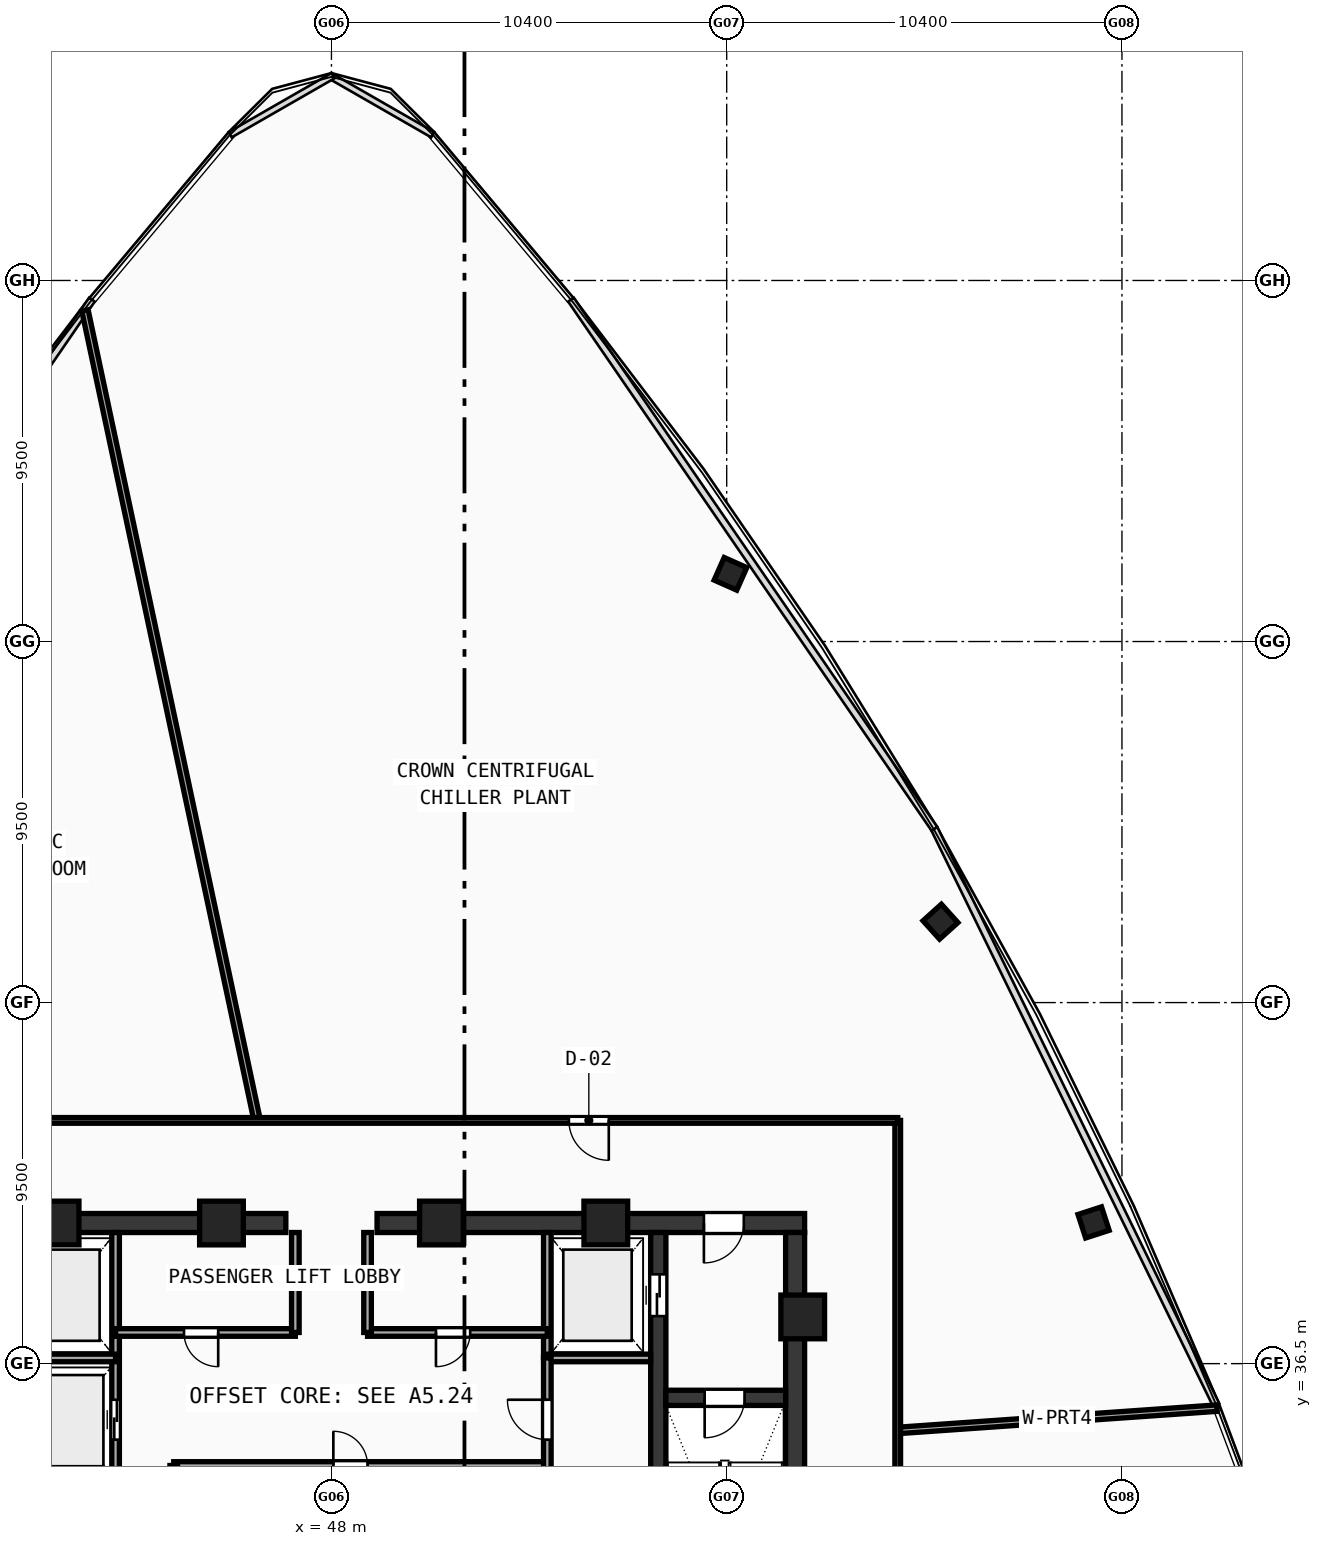
"""IFC4 building model, lengths in metres.
Left out: names, types, materials, properties, quantities, classifications, styles, units other than length and angle.
Written with IfcOpenShell. Run it as: python <this file> out.ifc"""

import sys

from ifc_helpers import new_model, si_unit, direction, frame, frame_2d, origin, origin_with_axes, origin_2d, place, context, subcontext, project, spatial, rectangle, hollow_rectangle, extrude, source, transform, mapped, element, fill, save


model = new_model("IFC4")
c1 = context("Model", 3, precision=1e-05, world=origin(), true_north=direction((0.0, 1.0)))
c2 = subcontext(c1, "Body", "Model", "MODEL_VIEW")
j1 = project(units=[si_unit("LENGTHUNIT", "METRE"), si_unit("PLANEANGLEUNIT", "RADIAN")], contexts=[c1])
p1 = place(None, origin())
s1 = spatial("IfcSite", under=j1, at=p1, CompositionType="ELEMENT")
p2 = place(p1, origin())
s2 = spatial("IfcBuilding", under=s1, at=p2, CompositionType="ELEMENT")
p3 = place(p2, frame((0.0, 0.0, 386.76)))
s3 = spatial("IfcBuildingStorey", under=s2, at=p3, CompositionType="ELEMENT", Elevation=386.76)
p4 = place(p3, frame((35.55, 40.2, 0.0), z_axis=(0.0, 0.0, 1.0), x_axis=(1.0, 0.0, 0.0)))
e1 = element("IfcWall", 1, at=p4, inside=s3, PredefinedType="SHEAR", context=c2, shape_type="SweptSolid", body=[
    extrude(rectangle(XDim=11.25, YDim=0.5, at=frame_2d((5.625, 0.0))), origin(), (0.0, 0.0, 1.0), 4.72),
])
p5 = place(p4, frame((1.6, 0.0, 0.0)))
e2 = element("IfcOpeningElement", 2, at=p5, cuts=e1, PredefinedType="OPENING", context=c2, shape_type="SweptSolid", body=[
    extrude(rectangle(XDim=1.05, YDim=2.1, at=frame_2d((0.525, 1.05))), frame((0.0, 0.26, 0.0), z_axis=(0.0, -1.0, 0.0), x_axis=(1.0, 0.0, 0.0)), (0.0, 0.0, 1.0), 0.52),
])
p6 = place(p3, frame((49.2, 40.2, 0.0), z_axis=(0.0, 0.0, 1.0), x_axis=(1.0, 0.0, 0.0)))
e3 = element("IfcWall", 3, at=p6, inside=s3, PredefinedType="SHEAR", context=c2, shape_type="SweptSolid", body=[
    extrude(rectangle(XDim=11.25, YDim=0.5, at=frame_2d((5.625, 0.0))), origin(), (0.0, 0.0, 1.0), 4.72),
])
p7 = place(p6, frame((8.6, 0.0, 0.0)))
e4 = element("IfcOpeningElement", 4, at=p7, cuts=e3, PredefinedType="OPENING", context=c2, shape_type="SweptSolid", body=[
    extrude(rectangle(XDim=1.05, YDim=2.1, at=frame_2d((0.525, 1.05))), frame((0.0, 0.26, 0.0), z_axis=(0.0, -1.0, 0.0), x_axis=(1.0, 0.0, 0.0)), (0.0, 0.0, 1.0), 0.52),
])
p8 = place(p3, frame((60.2, 27.75, 0.0), z_axis=(0.0, 0.0, 1.0), x_axis=(0.0, 1.0, 0.0)))
e5 = element("IfcWall", 5, at=p8, inside=s3, PredefinedType="SHEAR", context=c2, shape_type="SweptSolid", body=[
    extrude(rectangle(XDim=12.2, YDim=0.5, at=frame_2d((6.1, 0.0))), origin(), (0.0, 0.0, 1.0), 4.72),
])
p9 = place(p3, frame((56.6, 27.75, 0.0), z_axis=(0.0, 0.0, 1.0), x_axis=(0.0, 1.0, 0.0)))
e6 = element("IfcWall", 6, at=p9, inside=s3, PredefinedType="SHEAR", context=c2, shape_type="SweptSolid", body=[
    extrude(rectangle(XDim=12.2, YDim=0.4, at=frame_2d((6.1, 0.0))), origin(), (0.0, 0.0, 1.0), 4.72),
])
p10 = place(p9, frame((10.0, 0.0, 0.0)))
e7 = element("IfcOpeningElement", 7, at=p10, cuts=e6, PredefinedType="OPENING", context=c2, shape_type="SweptSolid", body=[
    extrude(rectangle(XDim=1.1, YDim=2.1, at=frame_2d((0.55, 1.05))), frame((0.0, 0.21, 0.0), z_axis=(0.0, -1.0, 0.0), x_axis=(1.0, 0.0, 0.0)), (0.0, 0.0, 1.0), 0.42),
])
p11 = place(p3, frame((56.8, 35.6, 0.0), z_axis=(0.0, 0.0, 1.0), x_axis=(1.0, 0.0, 0.0)))
e8 = element("IfcWall", 8, at=p11, inside=s3, PredefinedType="SHEAR", context=c2, shape_type="SweptSolid", body=[
    extrude(rectangle(XDim=3.15, YDim=0.4, at=frame_2d((1.575, 0.0))), origin(), (0.0, 0.0, 1.0), 4.72),
])
p12 = place(p11, frame((1.02, 0.0, 0.0)))
e9 = element("IfcOpeningElement", 9, at=p12, cuts=e8, PredefinedType="OPENING", context=c2, shape_type="SweptSolid", body=[
    extrude(rectangle(XDim=1.05, YDim=2.1, at=frame_2d((0.525, 1.05))), frame((0.0, 0.21, 0.0), z_axis=(0.0, -1.0, 0.0), x_axis=(1.0, 0.0, 0.0)), (0.0, 0.0, 1.0), 0.42),
])
m1 = source(origin(), c2, "Body", "SweptSolid", [
    extrude(hollow_rectangle(XDim=1.15, YDim=1.15, WallThickness=0.048, at=origin_2d()), origin(), (0.0, 0.0, 1.0), 5.0),
])
for number, where, z_axis, x_axis in (
    (10, (60.4, 37.729, -0.28), (0.0, 0.0, 1.0), (1.0, 0.0, 0.0)),
    (11, (55.219, 40.2, -0.28), (0.0, 0.0, 1.0), (1.0, 0.0, 0.0)),
    (12, (50.894, 40.2, -0.28), (0.0, 0.0, 1.0), (1.0, 0.0, 0.0)),
    (13, (45.106, 40.2, -0.28), (0.0, 0.0, 1.0), (1.0, 0.0, 0.0)),
    (14, (40.781, 40.2, -0.28), (0.0, 0.0, 1.0), (1.0, 0.0, 0.0)),
):
    element("IfcColumn", number, at=place(p3, frame(where, z_axis=z_axis, x_axis=x_axis)), inside=s3, PredefinedType="COLUMN", context=c2, shape_type="MappedRepresentation", body=[
        mapped(m1, transform((0.0, 0.0, 0.0), scale=1.0)),
    ])
m2 = source(origin(), c2, "Body", "SweptSolid", [
    extrude(hollow_rectangle(XDim=0.65, YDim=0.65, WallThickness=0.024, at=origin_2d()), origin(), (0.0, 0.0, 1.0), 5.0),
])
for number, where, z_axis, x_axis in (
    (15, (68.053, 40.216, -0.28), (0.0, 0.0, 1.0), (-0.309, 0.951, 0.0)),
    (16, (64.025, 48.129, -0.28), (0.0, 0.0, 1.0), (-0.669, 0.743, 0.0)),
    (17, (58.499, 57.281, -0.28), (0.0, 0.0, 1.0), (-0.914, 0.407, 0.0)),
):
    element("IfcColumn", number, at=place(p3, frame(where, z_axis=z_axis, x_axis=x_axis)), inside=s3, PredefinedType="COLUMN", context=c2, shape_type="MappedRepresentation", body=[
        mapped(m2, transform((0.0, 0.0, 0.0), scale=1.0)),
    ])
p13 = place(p3, frame((42.32, 33.5, 0.0), z_axis=(0.0, 0.0, 1.0), x_axis=(0.0, 1.0, 0.0)))
e18 = element("IfcWall", 18, at=p13, inside=s3, PredefinedType="SOLIDWALL", context=c2, shape_type="SweptSolid", body=[
    extrude(rectangle(XDim=6.45, YDim=0.2, at=frame_2d((3.225, 0.0))), origin(), (0.0, 0.0, 1.0), 4.72),
])
p14 = place(p13, frame((1.0, 0.0, 0.0)))
e19 = element("IfcOpeningElement", 19, at=p14, cuts=e18, PredefinedType="OPENING", context=c2, shape_type="SweptSolid", body=[
    extrude(rectangle(XDim=1.05, YDim=2.1, at=frame_2d((0.525, 1.05))), frame((0.0, 0.11, 0.0), z_axis=(0.0, -1.0, 0.0), x_axis=(1.0, 0.0, 0.0)), (0.0, 0.0, 1.0), 0.22),
])
p15 = place(p3, frame((39.6, 36.65, 0.0), z_axis=(0.0, 0.0, 1.0), x_axis=(1.0, 0.0, 0.0)))
e20 = element("IfcWall", 20, at=p15, inside=s3, PredefinedType="SOLIDWALL", context=c2, shape_type="SweptSolid", body=[
    extrude(rectangle(XDim=2.72, YDim=0.2, at=frame_2d((1.36, 0.0))), origin(), (0.0, 0.0, 1.0), 4.72),
])
p16 = place(p3, frame((53.68, 36.65, 0.0), z_axis=(0.0, 0.0, 1.0), x_axis=(0.0, 1.0, 0.0)))
e21 = element("IfcWall", 21, at=p16, inside=s3, PredefinedType="SOLIDWALL", context=c2, shape_type="SweptSolid", body=[
    extrude(rectangle(XDim=3.3, YDim=0.2, at=frame_2d((1.65, 0.0))), origin(), (0.0, 0.0, 1.0), 4.72),
])
p17 = place(p3, frame((53.68, 36.65, 0.0), z_axis=(0.0, 0.0, 1.0), x_axis=(1.0, 0.0, 0.0)))
e22 = element("IfcWall", 22, at=p17, inside=s3, PredefinedType="SOLIDWALL", context=c2, shape_type="SweptSolid", body=[
    extrude(rectangle(XDim=2.72, YDim=0.2, at=frame_2d((1.36, 0.0))), origin(), (0.0, 0.0, 1.0), 4.72),
])
p18 = place(p3, frame((42.32, 37.32, 0.0), z_axis=(0.0, 0.0, 1.0), x_axis=(1.0, 0.0, 0.0)))
e23 = element("IfcWall", 23, at=p18, inside=s3, PredefinedType="SOLIDWALL", context=c2, shape_type="SweptSolid", body=[
    extrude(rectangle(XDim=4.73, YDim=0.2, at=frame_2d((2.365, 0.0))), origin(), (0.0, 0.0, 1.0), 4.72),
])
p19 = place(p18, frame((1.8, 0.0, 0.0)))
e24 = element("IfcOpeningElement", 24, at=p19, cuts=e23, PredefinedType="OPENING", context=c2, shape_type="SweptSolid", body=[
    extrude(rectangle(XDim=0.9, YDim=2.1, at=frame_2d((0.45, 1.05))), frame((0.0, 0.11, 0.0), z_axis=(0.0, -1.0, 0.0), x_axis=(1.0, 0.0, 0.0)), (0.0, 0.0, 1.0), 0.22),
])
p20 = place(p3, frame((48.95, 37.32, 0.0), z_axis=(0.0, 0.0, 1.0), x_axis=(1.0, 0.0, 0.0)))
e25 = element("IfcWall", 25, at=p20, inside=s3, PredefinedType="SOLIDWALL", context=c2, shape_type="SweptSolid", body=[
    extrude(rectangle(XDim=4.73, YDim=0.2, at=frame_2d((2.365, 0.0))), origin(), (0.0, 0.0, 1.0), 4.72),
])
p21 = place(p20, frame((1.8, 0.0, 0.0)))
e26 = element("IfcOpeningElement", 26, at=p21, cuts=e25, PredefinedType="OPENING", context=c2, shape_type="SweptSolid", body=[
    extrude(rectangle(XDim=0.9, YDim=2.1, at=frame_2d((0.45, 1.05))), frame((0.0, 0.11, 0.0), z_axis=(0.0, -1.0, 0.0), x_axis=(1.0, 0.0, 0.0)), (0.0, 0.0, 1.0), 0.22),
])
for number, where, z_axis, x_axis in (
    (27, (47.05, 37.32, 0.0), (0.0, 0.0, 1.0), (0.0, 1.0, 0.0)),
    (28, (48.95, 37.32, 0.0), (0.0, 0.0, 1.0), (0.0, 1.0, 0.0)),
):
    element("IfcWall", number, at=place(p3, frame(where, z_axis=z_axis, x_axis=x_axis)), inside=s3, PredefinedType="SOLIDWALL", context=c2, shape_type="SweptSolid", body=[
        extrude(rectangle(XDim=2.63, YDim=0.2, at=frame_2d((1.315, 0.0))), origin(), (0.0, 0.0, 1.0), 4.72),
    ])
p22 = place(p3, frame((43.85, 33.82, 0.0), z_axis=(0.0, 0.0, 1.0), x_axis=(1.0, 0.0, 0.0)))
e29 = element("IfcWall", 29, at=p22, inside=s3, PredefinedType="SOLIDWALL", context=c2, shape_type="SweptSolid", body=[
    extrude(rectangle(XDim=9.83, YDim=0.2, at=frame_2d((4.915, 0.0))), origin(), (0.0, 0.0, 1.0), 4.72),
])
p23 = place(p22, frame((4.2, 0.0, 0.0)))
e30 = element("IfcOpeningElement", 30, at=p23, cuts=e29, PredefinedType="OPENING", context=c2, shape_type="SweptSolid", body=[
    extrude(rectangle(XDim=0.9, YDim=2.1, at=frame_2d((0.45, 1.05))), frame((0.0, 0.11, 0.0), z_axis=(0.0, -1.0, 0.0), x_axis=(1.0, 0.0, 0.0)), (0.0, 0.0, 1.0), 0.22),
])
p24 = place(p3, frame((43.85, 27.6, 0.0), z_axis=(0.0, 0.0, 1.0), x_axis=(0.0, 1.0, 0.0)))
e31 = element("IfcWall", 31, at=p24, inside=s3, PredefinedType="SOLIDWALL", context=c2, shape_type="SweptSolid", body=[
    extrude(rectangle(XDim=6.22, YDim=0.2, at=frame_2d((3.11, 0.0))), origin(), (0.0, 0.0, 1.0), 4.72),
])
p25 = place(p24, frame((2.25, 0.0, 0.0)))
e32 = element("IfcOpeningElement", 32, at=p25, cuts=e31, PredefinedType="OPENING", context=c2, shape_type="SweptSolid", body=[
    extrude(rectangle(XDim=1.05, YDim=2.1, at=frame_2d((0.525, 1.05))), frame((0.0, 0.11, 0.0), z_axis=(0.0, -1.0, 0.0), x_axis=(1.0, 0.0, 0.0)), (0.0, 0.0, 1.0), 0.22),
])
p26 = place(p3, frame((53.68, 27.6, 0.0), z_axis=(0.0, 0.0, 1.0), x_axis=(0.0, 1.0, 0.0)))
e33 = element("IfcWall", 33, at=p26, inside=s3, PredefinedType="SOLIDWALL", context=c2, shape_type="SweptSolid", body=[
    extrude(rectangle(XDim=9.05, YDim=0.2, at=frame_2d((4.525, 0.0))), origin(), (0.0, 0.0, 1.0), 4.72),
])
p27 = place(p26, frame((6.9, 0.0, 0.0)))
e34 = element("IfcOpeningElement", 34, at=p27, cuts=e33, PredefinedType="OPENING", context=c2, shape_type="SweptSolid", body=[
    extrude(rectangle(XDim=1.05, YDim=2.1, at=frame_2d((0.525, 1.05))), frame((0.0, 0.11, 0.0), z_axis=(0.0, -1.0, 0.0), x_axis=(1.0, 0.0, 0.0)), (0.0, 0.0, 1.0), 0.22),
])
p28 = place(p3, frame((62.9, 34.742, 0.0), z_axis=(0.0, 0.0, 1.0), x_axis=(0.997563993403, 0.069757286835, 0.0)))
e35 = element("IfcWall", 35, at=p28, inside=s3, PredefinedType="PARTITIONING", context=c2, shape_type="SweptSolid", body=[
    extrude(rectangle(XDim=8.421, YDim=0.17, at=frame_2d((4.21, 0.0))), origin(), (0.0, 0.0, 1.0), 4.12),
])
p29 = place(p3, frame((46.044, 42.9, 0.0), z_axis=(0.0, 0.0, 1.0), x_axis=(-0.207906465553, 0.978148711384, 0.0)))
e36 = element("IfcWall", 36, at=p29, inside=s3, PredefinedType="PARTITIONING", context=c2, shape_type="SweptSolid", body=[
    extrude(rectangle(XDim=21.788, YDim=0.17, at=frame_2d((10.894, 0.0))), origin(), (0.0, 0.0, 1.0), 4.12),
])
p30 = place(p3, frame((62.9, 24.9, 0.0), z_axis=(0.0, 0.0, 1.0), x_axis=(0.0, 1.0, 0.0)))
e37 = element("IfcWall", 37, at=p30, inside=s3, PredefinedType="PARTITIONING", context=c2, shape_type="SweptSolid", body=[
    extrude(rectangle(XDim=18.0, YDim=0.15, at=frame_2d((9.0, 0.0))), origin(), (0.0, 0.0, 1.0), 4.12),
])
p31 = place(p3, frame((62.9, 42.9, 0.0), z_axis=(0.0, 0.0, 1.0), x_axis=(-1.0, 0.0, 0.0)))
e38 = element("IfcWall", 38, at=p31, inside=s3, PredefinedType="PARTITIONING", context=c2, shape_type="SweptSolid", body=[
    extrude(rectangle(XDim=29.8, YDim=0.15, at=frame_2d((14.9, 0.0))), origin(), (0.0, 0.0, 1.0), 4.12),
])
p32 = place(p31, frame((7.603, 0.0, 0.0)))
e39 = element("IfcOpeningElement", 39, at=p32, cuts=e38, PredefinedType="OPENING", context=c2, shape_type="SweptSolid", body=[
    extrude(rectangle(XDim=1.05, YDim=2.1, at=frame_2d((0.525, 1.05))), frame((0.0, 0.085, 0.0), z_axis=(0.0, -1.0, 0.0), x_axis=(1.0, 0.0, 0.0)), (0.0, 0.0, 1.0), 0.17),
])
p33 = place(p31, frame((23.103, 0.0, 0.0)))
e40 = element("IfcOpeningElement", 40, at=p33, cuts=e38, PredefinedType="OPENING", context=c2, shape_type="SweptSolid", body=[
    extrude(rectangle(XDim=1.05, YDim=2.1, at=frame_2d((0.525, 1.05))), frame((0.0, 0.085, 0.0), z_axis=(0.0, -1.0, 0.0), x_axis=(1.0, 0.0, 0.0)), (0.0, 0.0, 1.0), 0.17),
])
m3 = source(origin(), c2, "Body", "SweptSolid", [
    extrude(rectangle(XDim=1.05, YDim=2.1, at=frame_2d((0.525, 1.05))), frame((0.0, 0.025, 0.0), z_axis=(0.0, -1.0, 0.0), x_axis=(1.0, 0.0, 0.0)), (0.0, 0.0, 1.0), 0.05),
])
p34 = place(p12, frame((1.05, 0.0, 0.0), z_axis=(0.0, 0.0, 1.0), x_axis=(-1.0, 0.0, 0.0)))
e41 = element("IfcDoor", 41, at=p34, inside=s3, OperationType="SINGLE_SWING_RIGHT", PredefinedType="DOOR", context=c2, shape_type="MappedRepresentation", body=[
    mapped(m3, transform((0.0, 0.0, 0.0), scale=1.0)),
])
fill(e9, e41)
p35 = place(p7, frame((1.05, 0.0, 0.0), z_axis=(0.0, 0.0, 1.0), x_axis=(-1.0, 0.0, 0.0)))
e42 = element("IfcDoor", 42, at=p35, inside=s3, OperationType="SINGLE_SWING_RIGHT", PredefinedType="DOOR", context=c2, shape_type="MappedRepresentation", body=[
    mapped(m3, transform((0.0, 0.0, 0.0), scale=1.0)),
])
fill(e4, e42)
m4 = source(origin(), c2, "Body", "SweptSolid", [
    extrude(rectangle(XDim=1.1, YDim=2.1, at=frame_2d((0.55, 1.05))), frame((0.0, 0.025, 0.0), z_axis=(0.0, -1.0, 0.0), x_axis=(1.0, 0.0, 0.0)), (0.0, 0.0, 1.0), 0.05),
])
p36 = place(p10, origin_with_axes())
e43 = element("IfcDoor", 43, at=p36, inside=s3, OperationType="DOUBLE_DOOR_SLIDING", PredefinedType="DOOR", context=c2, shape_type="MappedRepresentation", body=[
    mapped(m4, transform((0.0, 0.0, 0.0), scale=1.0)),
])
fill(e7, e43)
p37 = place(p14, origin_with_axes())
e44 = element("IfcDoor", 44, at=p37, inside=s3, OperationType="DOUBLE_DOOR_SLIDING", PredefinedType="DOOR", context=c2, shape_type="MappedRepresentation", body=[
    mapped(m3, transform((0.0, 0.0, 0.0), scale=1.0)),
])
fill(e19, e44)
m5 = source(origin(), c2, "Body", "SweptSolid", [
    extrude(rectangle(XDim=0.9, YDim=2.1, at=frame_2d((0.45, 1.05))), frame((0.0, 0.025, 0.0), z_axis=(0.0, -1.0, 0.0), x_axis=(1.0, 0.0, 0.0)), (0.0, 0.0, 1.0), 0.05),
])
p38 = place(p19, frame((0.9, 0.0, 0.0), z_axis=(0.0, 0.0, 1.0), x_axis=(-1.0, 0.0, 0.0)))
e45 = element("IfcDoor", 45, at=p38, inside=s3, OperationType="SINGLE_SWING_LEFT", PredefinedType="DOOR", context=c2, shape_type="MappedRepresentation", body=[
    mapped(m5, transform((0.0, 0.0, 0.0), scale=1.0)),
])
fill(e24, e45)
p39 = place(p21, frame((0.9, 0.0, 0.0), z_axis=(0.0, 0.0, 1.0), x_axis=(-1.0, 0.0, 0.0)))
e46 = element("IfcDoor", 46, at=p39, inside=s3, OperationType="SINGLE_SWING_RIGHT", PredefinedType="DOOR", context=c2, shape_type="MappedRepresentation", body=[
    mapped(m5, transform((0.0, 0.0, 0.0), scale=1.0)),
])
fill(e26, e46)
p40 = place(p23, origin_with_axes())
e47 = element("IfcDoor", 47, at=p40, inside=s3, OperationType="SINGLE_SWING_LEFT", PredefinedType="DOOR", context=c2, shape_type="MappedRepresentation", body=[
    mapped(m5, transform((0.0, 0.0, 0.0), scale=1.0)),
])
fill(e30, e47)
p41 = place(p27, origin_with_axes())
e48 = element("IfcDoor", 48, at=p41, inside=s3, OperationType="SINGLE_SWING_RIGHT", PredefinedType="DOOR", context=c2, shape_type="MappedRepresentation", body=[
    mapped(m3, transform((0.0, 0.0, 0.0), scale=1.0)),
])
fill(e34, e48)
p42 = place(p32, origin_with_axes())
e49 = element("IfcDoor", 49, at=p42, inside=s3, OperationType="SINGLE_SWING_LEFT", PredefinedType="DOOR", context=c2, shape_type="MappedRepresentation", body=[
    mapped(m3, transform((0.0, 0.0, 0.0), scale=1.0)),
])
fill(e39, e49)
save(model, sys.argv[1])
